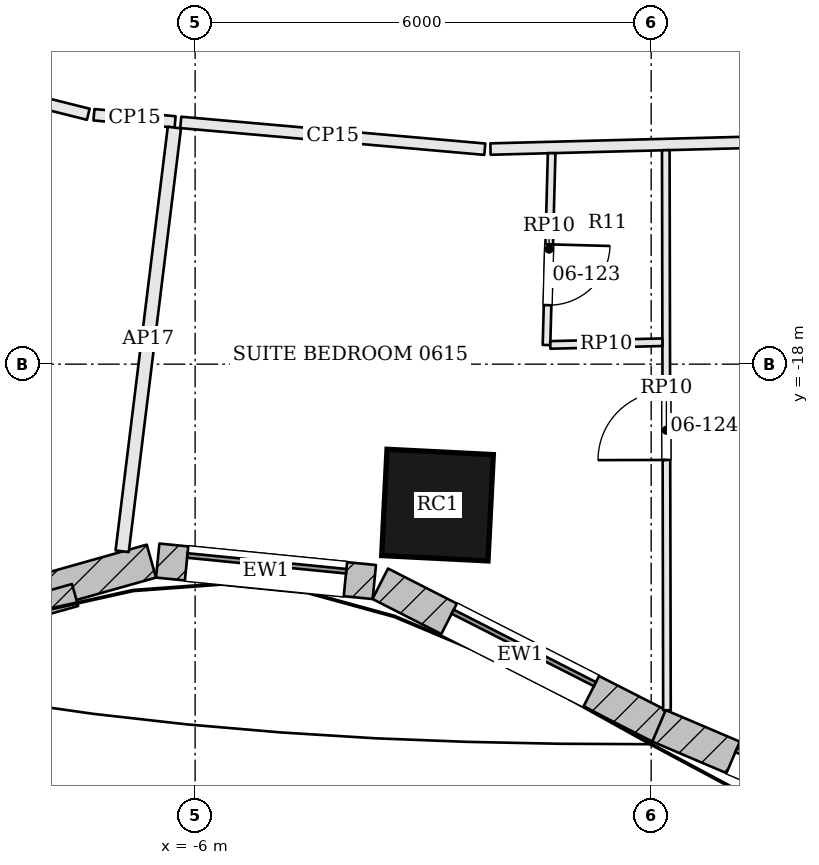
"""IFC4 building model, lengths in metres.
Left out: names, types, materials, properties, quantities, classifications, styles, units other than length and angle.
Written with IfcOpenShell. Run it as: python <this file> out.ifc"""

import sys

from ifc_helpers import new_model, si_unit, direction, frame, frame_2d, origin, origin_2d, place, context, subcontext, project, spatial, rectangle, extrude, element, fill, save


model = new_model("IFC4")
c1 = context("Model", 3, precision=1e-05, world=origin(), true_north=direction((0.0, 1.0)))
c2 = subcontext(c1, "Body", "Model", "MODEL_VIEW")
j1 = project(units=[si_unit("LENGTHUNIT", "METRE"), si_unit("PLANEANGLEUNIT", "RADIAN")], contexts=[c1])
p1 = place(None, origin())
s1 = spatial("IfcSite", under=j1, at=p1, CompositionType="ELEMENT")
p2 = place(p1, origin())
s2 = spatial("IfcBuilding", under=s1, at=p2, CompositionType="ELEMENT")
p3 = place(p2, frame((0.0, 0.0, 37.5)))
s3 = spatial("IfcBuildingStorey", under=s2, at=p3, CompositionType="ELEMENT", Elevation=37.5)
p4 = place(p3, frame((-2.811, -19.854, 0.0), z_axis=(0.0, 0.0, 1.0), x_axis=(0.99874501614, -0.050083857035, 0.0)))
e1 = element("IfcColumn", 1, at=p4, inside=s3, PredefinedType="COLUMN", context=c2, shape_type="SweptSolid", body=[
    extrude(rectangle(XDim=1.4, YDim=1.4, at=origin_2d()), origin(), (0.0, 0.0, 1.0), 3.6),
])
p5 = place(p3, frame((-11.732, -22.044, 0.0), z_axis=(0.0, 0.0, 1.0), x_axis=(0.962535416232, 0.271155992925, 0.0)))
e2 = element("IfcWall", 2, at=p5, inside=s3, PredefinedType="SOLIDWALL", context=c2, shape_type="SweptSolid", body=[
    extrude(rectangle(XDim=5.357, YDim=0.45, at=frame_2d((2.679, 0.0))), origin(), (0.0, 0.0, 1.0), 3.4),
])
p6 = place(p5, frame((1.629, 0.0, 0.9)))
e3 = element("IfcOpeningElement", 3, at=p6, cuts=e2, PredefinedType="OPENING", context=c2, shape_type="SweptSolid", body=[
    extrude(rectangle(XDim=2.1, YDim=2.0, at=frame_2d((1.05, 1.0))), frame((0.0, 0.235, 0.0), z_axis=(0.0, -1.0, 0.0), x_axis=(1.0, 0.0, 0.0)), (0.0, 0.0, 1.0), 0.47),
])
p7 = place(p3, frame((-6.492, -20.584, 0.0), z_axis=(0.0, 0.0, 1.0), x_axis=(0.995123748575, -0.098634299418, 0.0)))
e4 = element("IfcWall", 4, at=p7, inside=s3, PredefinedType="SOLIDWALL", context=c2, shape_type="SweptSolid", body=[
    extrude(rectangle(XDim=2.864, YDim=0.45, at=frame_2d((1.432, 0.0))), origin(), (0.0, 0.0, 1.0), 3.4),
])
p8 = place(p7, frame((0.382, 0.0, 0.9)))
e5 = element("IfcOpeningElement", 5, at=p8, cuts=e4, PredefinedType="OPENING", context=c2, shape_type="SweptSolid", body=[
    extrude(rectangle(XDim=2.1, YDim=2.0, at=frame_2d((1.05, 1.0))), frame((0.0, 0.235, 0.0), z_axis=(0.0, -1.0, 0.0), x_axis=(1.0, 0.0, 0.0)), (0.0, 0.0, 1.0), 0.47),
])
p9 = place(p3, frame((-3.564, -20.889, 0.0), z_axis=(0.0, 0.0, 1.0), x_axis=(0.891033634447, -0.453937288933, 0.0)))
e6 = element("IfcWall", 6, at=p9, inside=s3, PredefinedType="SOLIDWALL", context=c2, shape_type="SweptSolid", body=[
    extrude(rectangle(XDim=4.132, YDim=0.45, at=frame_2d((2.066, 0.0))), origin(), (0.0, 0.0, 1.0), 3.4),
])
p10 = place(p9, frame((1.016, 0.0, 0.9)))
e7 = element("IfcOpeningElement", 7, at=p10, cuts=e6, PredefinedType="OPENING", context=c2, shape_type="SweptSolid", body=[
    extrude(rectangle(XDim=2.1, YDim=2.0, at=frame_2d((1.05, 1.0))), frame((0.0, 0.235, 0.0), z_axis=(0.0, -1.0, 0.0), x_axis=(1.0, 0.0, 0.0)), (0.0, 0.0, 1.0), 0.47),
])
p11 = place(p3, frame((0.103, -22.758, 0.0), z_axis=(0.0, 0.0, 1.0), x_axis=(0.920037498786, -0.391830321475, 0.0)))
e8 = element("IfcWall", 8, at=p11, inside=s3, PredefinedType="SOLIDWALL", context=c2, shape_type="SweptSolid", body=[
    extrude(rectangle(XDim=4.219, YDim=0.45, at=frame_2d((2.11, 0.0))), origin(), (0.0, 0.0, 1.0), 3.4),
])
p12 = place(p11, frame((1.06, 0.0, 0.9)))
e9 = element("IfcOpeningElement", 9, at=p12, cuts=e8, PredefinedType="OPENING", context=c2, shape_type="SweptSolid", body=[
    extrude(rectangle(XDim=2.1, YDim=2.0, at=frame_2d((1.05, 1.0))), frame((0.0, 0.235, 0.0), z_axis=(0.0, -1.0, 0.0), x_axis=(1.0, 0.0, 0.0)), (0.0, 0.0, 1.0), 0.47),
])
p13 = place(p3, frame((-11.314, -22.089, 3.6), z_axis=(0.0, 0.0, 1.0), x_axis=(0.962524249835, 0.271195627691, 0.0)))
e10 = element("IfcWall", 10, at=p13, inside=s3, PredefinedType="PARAPET", context=c2, shape_type="SweptSolid", body=[
    extrude(rectangle(XDim=3.88, YDim=0.3, at=frame_2d((1.94, 0.0))), origin(), (0.0, 0.0, 1.0), 1.1),
])
p14 = place(p3, frame((-12.371, -13.468, 0.0), z_axis=(0.0, 0.0, 1.0), x_axis=(0.969987994087, -0.243152814764, 0.0)))
e11 = element("IfcWall", 11, at=p14, inside=s3, PredefinedType="PARTITIONING", context=c2, shape_type="SweptSolid", body=[
    extrude(rectangle(XDim=5.119, YDim=0.15, at=frame_2d((2.559, 0.0))), origin(), (0.0, 0.0, 1.0), 2.68),
])
p15 = place(p14, frame((1.028, 0.0, 0.0)))
e12 = element("IfcOpeningElement", 12, at=p15, cuts=e11, PredefinedType="OPENING", context=c2, shape_type="SweptSolid", body=[
    extrude(rectangle(XDim=1.0, YDim=2.1, at=frame_2d((0.5, 1.05))), frame((0.0, 0.085, 0.0), z_axis=(0.0, -1.0, 0.0), x_axis=(1.0, 0.0, 0.0)), (0.0, 0.0, 1.0), 0.17),
])
p16 = place(p3, frame((-7.331, -14.719, 0.0), z_axis=(0.0, 0.0, 1.0), x_axis=(0.996145089984, -0.087720919406, 0.0)))
e13 = element("IfcWall", 13, at=p16, inside=s3, PredefinedType="PARTITIONING", context=c2, shape_type="SweptSolid", body=[
    extrude(rectangle(XDim=1.072, YDim=0.15, at=frame_2d((0.536, 0.0))), origin(), (0.0, 0.0, 1.0), 2.68),
])
p17 = place(p3, frame((-6.96, -20.462, 0.0), z_axis=(0.0, 0.0, 1.0), x_axis=(0.122317252329, 0.992491052747, 0.0)))
e14 = element("IfcWall", 14, at=p17, inside=s3, PredefinedType="PARTITIONING", context=c2, shape_type="SweptSolid", body=[
    extrude(rectangle(XDim=5.617, YDim=0.175, at=frame_2d((2.808, 0.0))), origin(), (0.0, 0.0, 1.0), 2.68),
])
p18 = place(p3, frame((-6.189, -14.82, 0.0), z_axis=(0.0, 0.0, 1.0), x_axis=(0.996138144042, -0.087799760727, 0.0)))
e15 = element("IfcWall", 15, at=p18, inside=s3, PredefinedType="PARTITIONING", context=c2, shape_type="SweptSolid", body=[
    extrude(rectangle(XDim=4.015, YDim=0.15, at=frame_2d((2.008, 0.0))), origin(), (0.0, 0.0, 1.0), 2.68),
])
p19 = place(p3, frame((-2.114, -15.17, 0.0), z_axis=(0.0, 0.0, 1.0), x_axis=(0.999661895531, 0.026001819598, 0.0)))
e16 = element("IfcWall", 16, at=p19, inside=s3, PredefinedType="PARTITIONING", context=c2, shape_type="SweptSolid", body=[
    extrude(rectangle(XDim=7.455, YDim=0.15, at=frame_2d((3.728, 0.0))), origin(), (0.0, 0.0, 1.0), 2.68),
])
p20 = place(p19, frame((4.954, 0.0, 0.0)))
e17 = element("IfcOpeningElement", 17, at=p20, cuts=e16, PredefinedType="OPENING", context=c2, shape_type="SweptSolid", body=[
    extrude(rectangle(XDim=1.0, YDim=2.1, at=frame_2d((0.5, 1.05))), frame((0.0, 0.085, 0.0), z_axis=(0.0, -1.0, 0.0), x_axis=(1.0, 0.0, 0.0)), (0.0, 0.0, 1.0), 0.17),
])
p21 = place(p3, frame((0.208, -22.553, 0.0), z_axis=(0.0, 0.0, 1.0), x_axis=(-0.002054404359, 0.999997889709, 0.0)))
e18 = element("IfcWall", 18, at=p21, inside=s3, PredefinedType="PARTITIONING", context=c2, shape_type="SweptSolid", body=[
    extrude(rectangle(XDim=7.368, YDim=0.1, at=frame_2d((3.684, 0.0))), origin(), (0.0, 0.0, 1.0), 2.884),
])
p22 = place(p21, frame((3.293, 0.0, 0.0)))
e19 = element("IfcOpeningElement", 19, at=p22, cuts=e18, PredefinedType="OPENING", context=c2, shape_type="SweptSolid", body=[
    extrude(rectangle(XDim=0.9, YDim=2.4, at=frame_2d((0.45, 1.2))), frame((0.0, 0.06, 0.0), z_axis=(0.0, -1.0, 0.0), x_axis=(1.0, 0.0, 0.0)), (0.0, 0.0, 1.0), 0.12),
])
p23 = place(p3, frame((-1.309, -15.224, 0.0), z_axis=(0.0, 0.0, 1.0), x_axis=(-0.026878765722, -0.999638700708, 0.0)))
e20 = element("IfcWall", 20, at=p23, inside=s3, PredefinedType="PARTITIONING", context=c2, shape_type="SweptSolid", body=[
    extrude(rectangle(XDim=2.525, YDim=0.1, at=frame_2d((1.263, 0.0))), origin(), (0.0, 0.0, 1.0), 2.884),
])
p24 = place(p23, frame((1.2, 0.0, 0.0)))
e21 = element("IfcOpeningElement", 21, at=p24, cuts=e20, PredefinedType="OPENING", context=c2, shape_type="SweptSolid", body=[
    extrude(rectangle(XDim=0.8, YDim=2.1, at=frame_2d((0.4, 1.05))), frame((0.0, 0.06, 0.0), z_axis=(0.0, -1.0, 0.0), x_axis=(1.0, 0.0, 0.0)), (0.0, 0.0, 1.0), 0.12),
])
p25 = place(p3, frame((-1.327, -17.747, 0.0), z_axis=(0.0, 0.0, 1.0), x_axis=(0.999707980688, 0.024165126686, 0.0)))
e22 = element("IfcWall", 22, at=p25, inside=s3, PredefinedType="PARTITIONING", context=c2, shape_type="SweptSolid", body=[
    extrude(rectangle(XDim=1.475, YDim=0.1, at=frame_2d((0.738, 0.0))), origin(), (0.0, 0.0, 1.0), 2.884),
])
p26 = place(p8, origin())
e23 = element("IfcWindow", 23, at=p26, inside=s3, PartitioningType="SINGLE_PANEL", PredefinedType="WINDOW", context=c2, shape_type="SweptSolid", body=[
    extrude(rectangle(XDim=2.1, YDim=2.0, at=frame_2d((1.05, 1.0))), frame((0.0, 0.135, 0.0), z_axis=(0.0, -1.0, 0.0), x_axis=(1.0, 0.0, 0.0)), (0.0, 0.0, 1.0), 0.06),
])
fill(e5, e23)
p27 = place(p10, origin())
e24 = element("IfcWindow", 24, at=p27, inside=s3, PartitioningType="SINGLE_PANEL", PredefinedType="WINDOW", context=c2, shape_type="SweptSolid", body=[
    extrude(rectangle(XDim=2.1, YDim=2.0, at=frame_2d((1.05, 1.0))), frame((0.0, 0.135, 0.0), z_axis=(0.0, -1.0, 0.0), x_axis=(1.0, 0.0, 0.0)), (0.0, 0.0, 1.0), 0.06),
])
fill(e7, e24)
p28 = place(p12, origin())
e25 = element("IfcWindow", 25, at=p28, inside=s3, PartitioningType="SINGLE_PANEL", PredefinedType="WINDOW", context=c2, shape_type="SweptSolid", body=[
    extrude(rectangle(XDim=2.1, YDim=2.0, at=frame_2d((1.05, 1.0))), frame((0.0, 0.135, 0.0), z_axis=(0.0, -1.0, 0.0), x_axis=(1.0, 0.0, 0.0)), (0.0, 0.0, 1.0), 0.06),
])
fill(e9, e25)
p29 = place(p24, origin())
e26 = element("IfcDoor", 26, at=p29, inside=s3, OperationType="SINGLE_SWING_LEFT", PredefinedType="DOOR", context=c2, shape_type="SweptSolid", body=[
    extrude(rectangle(XDim=0.8, YDim=2.1, at=frame_2d((0.4, 1.05))), frame((0.0, 0.025, 0.0), z_axis=(0.0, -1.0, 0.0), x_axis=(1.0, 0.0, 0.0)), (0.0, 0.0, 1.0), 0.05),
])
fill(e21, e26)
p30 = place(p22, origin())
e27 = element("IfcDoor", 27, at=p30, inside=s3, OperationType="SINGLE_SWING_LEFT", PredefinedType="DOOR", context=c2, shape_type="SweptSolid", body=[
    extrude(rectangle(XDim=0.9, YDim=2.4, at=frame_2d((0.45, 1.2))), frame((0.0, 0.025, 0.0), z_axis=(0.0, -1.0, 0.0), x_axis=(1.0, 0.0, 0.0)), (0.0, 0.0, 1.0), 0.05),
])
fill(e19, e27)
save(model, sys.argv[1])
